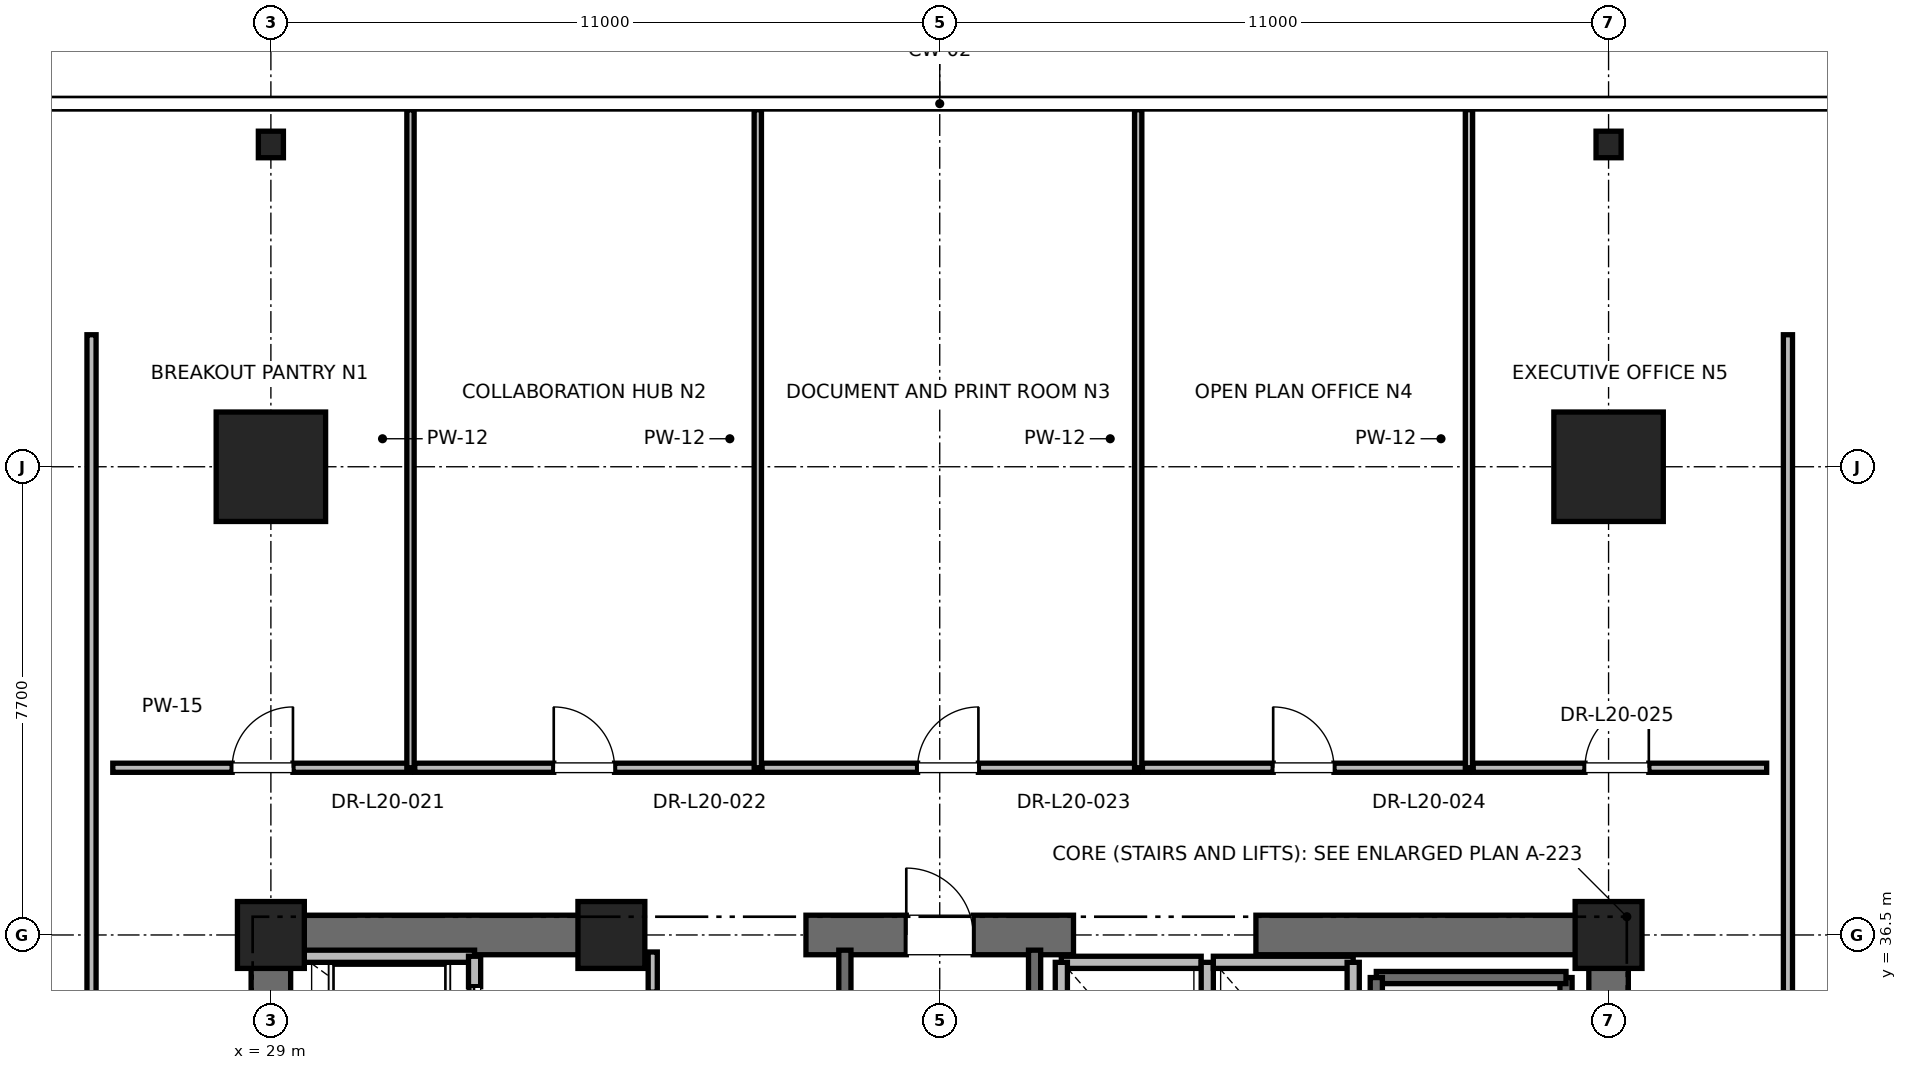
"""IFC4 building model, lengths in metres.
Left out: names, types, materials, properties, quantities, classifications, styles, units other than length and angle.
Written with IfcOpenShell. Run it as: python <this file> out.ifc"""

import sys

from ifc_helpers import new_model, si_unit, direction, frame, frame_2d, origin, origin_2d, place, context, subcontext, project, spatial, rectangle, i_section, extrude, element, fill, save


model = new_model("IFC4")
c1 = context("Model", 3, precision=1e-05, world=origin(), true_north=direction((0.0, 1.0)))
c2 = subcontext(c1, "Body", "Model", "MODEL_VIEW")
j1 = project(units=[si_unit("LENGTHUNIT", "METRE"), si_unit("PLANEANGLEUNIT", "RADIAN")], contexts=[c1])
p1 = place(None, origin())
s1 = spatial("IfcSite", under=j1, at=p1, CompositionType="ELEMENT")
p2 = place(p1, origin())
s2 = spatial("IfcBuilding", under=s1, at=p2, CompositionType="ELEMENT")
p3 = place(p2, frame((0.0, 0.0, 87.6)))
s3 = spatial("IfcBuildingStorey", under=s2, at=p3, CompositionType="ELEMENT", Elevation=87.6)
for number, where, z_axis, x_axis in (
    (1, (29.0, 44.2, 0.0), (0.0, 0.0, 1.0), (1.0, 0.0, 0.0)),
    (2, (51.0, 44.2, 0.0), (0.0, 0.0, 1.0), (1.0, 0.0, 0.0)),
):
    element("IfcColumn", number, at=place(p3, frame(where, z_axis=z_axis, x_axis=x_axis)), inside=s3, PredefinedType="COLUMN", context=c2, shape_type="SweptSolid", body=[
        extrude(rectangle(XDim=1.8, YDim=1.8, at=origin_2d()), origin(), (0.0, 0.0, 1.0), 4.0),
    ])
for number, where, z_axis, x_axis in (
    (3, (29.0, 49.5, 0.0), (0.0, 0.0, 1.0), (1.0, 0.0, 0.0)),
    (4, (51.0, 49.5, 0.0), (0.0, 0.0, 1.0), (1.0, 0.0, 0.0)),
):
    element("IfcColumn", number, at=place(p3, frame(where, z_axis=z_axis, x_axis=x_axis)), inside=s3, PredefinedType="COLUMN", context=c2, shape_type="SweptSolid", body=[
        extrude(i_section(OverallWidth=0.412, OverallDepth=0.437, WebThickness=0.036, FlangeThickness=0.058, FilletRadius=0.015, at=origin_2d()), origin(), (0.0, 0.0, 1.0), 4.0),
    ])
for number, where, z_axis, x_axis in (
    (5, (29.0, 36.5, 0.0), (0.0, 0.0, 1.0), (1.0, 0.0, 0.0)),
    (6, (51.0, 36.5, 0.0), (0.0, 0.0, 1.0), (1.0, 0.0, 0.0)),
    (7, (34.6, 36.5, 0.0), (0.0, 0.0, 1.0), (1.0, 0.0, 0.0)),
):
    element("IfcColumn", number, at=place(p3, frame(where, z_axis=z_axis, x_axis=x_axis)), inside=s3, PredefinedType="PILASTER", context=c2, shape_type="SweptSolid", body=[
        extrude(rectangle(XDim=1.1, YDim=1.1, at=origin_2d()), origin(), (0.0, 0.0, 1.0), 4.0),
    ])
p4 = place(p3, frame((29.0, 36.5, 0.0), z_axis=(0.0, 0.0, 1.0), x_axis=(1.0, 0.0, 0.0)))
e8 = element("IfcWall", 8, at=p4, inside=s3, PredefinedType="SHEAR", context=c2, shape_type="SweptSolid", body=[
    extrude(rectangle(XDim=5.8, YDim=0.65, at=frame_2d((2.9, 0.0))), origin(), (0.0, 0.0, 1.0), 3.76),
])
p5 = place(p3, frame((37.8, 36.5, 0.0), z_axis=(0.0, 0.0, 1.0), x_axis=(1.0, 0.0, 0.0)))
e9 = element("IfcWall", 9, at=p5, inside=s3, PredefinedType="SHEAR", context=c2, shape_type="SweptSolid", body=[
    extrude(rectangle(XDim=4.4, YDim=0.65, at=frame_2d((2.2, 0.0))), origin(), (0.0, 0.0, 1.0), 3.76),
])
p6 = place(p5, frame((1.65, 0.0, 0.0)))
e10 = element("IfcOpeningElement", 10, at=p6, cuts=e9, PredefinedType="OPENING", context=c2, shape_type="SweptSolid", body=[
    extrude(rectangle(XDim=1.1, YDim=2.15, at=frame_2d((0.55, 1.075))), frame((0.0, 0.325, 0.0), z_axis=(0.0, -1.0, 0.0), x_axis=(1.0, 0.0, 0.0)), (0.0, 0.0, 1.0), 0.65),
])
for number, where, z_axis, x_axis in (
    (11, (45.2, 36.5, 0.0), (0.0, 0.0, 1.0), (1.0, 0.0, 0.0)),
    (12, (29.0, 30.7, 0.0), (0.0, 0.0, 1.0), (0.0, 1.0, 0.0)),
):
    element("IfcWall", number, at=place(p3, frame(where, z_axis=z_axis, x_axis=x_axis)), inside=s3, PredefinedType="SHEAR", context=c2, shape_type="SweptSolid", body=[
        extrude(rectangle(XDim=5.8, YDim=0.65, at=frame_2d((2.9, 0.0))), origin(), (0.0, 0.0, 1.0), 3.76),
    ])
p7 = place(p3, frame((51.0, 27.7, 0.0), z_axis=(0.0, 0.0, 1.0), x_axis=(0.0, 1.0, 0.0)))
e13 = element("IfcWall", 13, at=p7, inside=s3, PredefinedType="SHEAR", context=c2, shape_type="SweptSolid", body=[
    extrude(rectangle(XDim=8.8, YDim=0.65, at=frame_2d((4.4, 0.0))), origin(), (0.0, 0.0, 1.0), 3.76),
])
p8 = place(p3, frame((50.3, 27.65, 0.0), z_axis=(0.0, 0.0, 1.0), x_axis=(0.0, 1.0, 0.0)))
e14 = element("IfcWall", 14, at=p8, inside=s3, PredefinedType="SOLIDWALL", context=c2, shape_type="SweptSolid", body=[
    extrude(rectangle(XDim=8.15, YDim=0.2, at=frame_2d((4.075, 0.0))), origin(), (0.0, 0.0, 1.0), 3.76),
])
p9 = place(p3, frame((47.18, 35.8, 0.0), z_axis=(0.0, 0.0, 1.0), x_axis=(1.0, 0.0, 0.0)))
e15 = element("IfcWall", 15, at=p9, inside=s3, PredefinedType="SOLIDWALL", context=c2, shape_type="SweptSolid", body=[
    extrude(rectangle(XDim=3.12, YDim=0.2, at=frame_2d((1.56, 0.0))), origin(), (0.0, 0.0, 1.0), 3.76),
])
p10 = place(p3, frame((47.18, 27.62, 0.0), z_axis=(0.0, 0.0, 1.0), x_axis=(0.0, 1.0, 0.0)))
e16 = element("IfcWall", 16, at=p10, inside=s3, PredefinedType="SOLIDWALL", context=c2, shape_type="SweptSolid", body=[
    extrude(rectangle(XDim=8.18, YDim=0.2, at=frame_2d((4.09, 0.0))), origin(), (0.0, 0.0, 1.0), 3.76),
])
p11 = place(p3, frame((38.44, 27.38, 0.0), z_axis=(0.0, 0.0, 1.0), x_axis=(0.0, 1.0, 0.0)))
e17 = element("IfcWall", 17, at=p11, inside=s3, PredefinedType="SOLIDWALL", context=c2, shape_type="SweptSolid", body=[
    extrude(rectangle(XDim=8.87, YDim=0.2, at=frame_2d((4.435, 0.0))), origin(), (0.0, 0.0, 1.0), 3.76),
])
p12 = place(p3, frame((41.56, 27.68, 0.0), z_axis=(0.0, 0.0, 1.0), x_axis=(0.0, 1.0, 0.0)))
e18 = element("IfcWall", 18, at=p12, inside=s3, PredefinedType="SOLIDWALL", context=c2, shape_type="SweptSolid", body=[
    extrude(rectangle(XDim=8.57, YDim=0.2, at=frame_2d((4.285, 0.0))), origin(), (0.0, 0.0, 1.0), 3.76),
])
p13 = place(p3, frame((32.35, 36.15, 0.0), z_axis=(0.0, 0.0, 1.0), x_axis=(-1.0, 0.0, 0.0)))
e19 = element("IfcWall", 19, at=p13, inside=s3, PredefinedType="SOLIDWALL", context=c2, shape_type="SweptSolid", body=[
    extrude(rectangle(XDim=2.8, YDim=0.2, at=frame_2d((1.4, 0.0))), origin(), (0.0, 0.0, 1.0), 2.889),
])
p14 = place(p3, frame((32.35, 34.05, 0.0), z_axis=(0.0, 0.0, 1.0), x_axis=(0.0, 1.0, 0.0)))
e20 = element("IfcWall", 20, at=p14, inside=s3, PredefinedType="SOLIDWALL", context=c2, shape_type="SweptSolid", body=[
    extrude(rectangle(XDim=2.1, YDim=0.2, at=frame_2d((1.05, 0.0))), origin(), (0.0, 0.0, 1.0), 3.76),
])
p15 = place(p14, frame((0.5, 0.0, 0.0)))
e21 = element("IfcOpeningElement", 21, at=p15, cuts=e20, PredefinedType="OPENING", context=c2, shape_type="SweptSolid", body=[
    extrude(rectangle(XDim=1.1, YDim=2.2, at=frame_2d((0.55, 1.1))), frame((0.0, 0.1, 0.0), z_axis=(0.0, -1.0, 0.0), x_axis=(1.0, 0.0, 0.0)), (0.0, 0.0, 1.0), 0.2),
])
p16 = place(p3, frame((44.3, 36.05, 0.0), z_axis=(0.0, 0.0, 1.0), x_axis=(-1.0, 0.0, 0.0)))
e22 = element("IfcWall", 22, at=p16, inside=s3, PredefinedType="SOLIDWALL", context=c2, shape_type="SweptSolid", body=[
    extrude(rectangle(XDim=2.3, YDim=0.2, at=frame_2d((1.15, 0.0))), origin(), (0.0, 0.0, 1.0), 2.54),
])
for number, where, z_axis, x_axis in (
    (23, (42.0, 36.05, 0.0), (0.0, 0.0, 1.0), (0.0, -1.0, 0.0)),
    (24, (44.4, 33.45, 0.0), (0.0, 0.0, 1.0), (0.0, 1.0, 0.0)),
):
    element("IfcWall", number, at=place(p3, frame(where, z_axis=z_axis, x_axis=x_axis)), inside=s3, PredefinedType="SOLIDWALL", context=c2, shape_type="SweptSolid", body=[
        extrude(rectangle(XDim=2.6, YDim=0.2, at=frame_2d((1.3, 0.0))), origin(), (0.0, 0.0, 1.0), 2.54),
    ])
p17 = place(p3, frame((46.8, 36.05, 0.0), z_axis=(0.0, 0.0, 1.0), x_axis=(-1.0, 0.0, 0.0)))
e25 = element("IfcWall", 25, at=p17, inside=s3, PredefinedType="SOLIDWALL", context=c2, shape_type="SweptSolid", body=[
    extrude(rectangle(XDim=2.3, YDim=0.2, at=frame_2d((1.15, 0.0))), origin(), (0.0, 0.0, 1.0), 2.54),
])
p18 = place(p3, frame((46.8, 33.45, 0.0), z_axis=(0.0, 0.0, 1.0), x_axis=(0.0, 1.0, 0.0)))
e26 = element("IfcWall", 26, at=p18, inside=s3, PredefinedType="SOLIDWALL", context=c2, shape_type="SweptSolid", body=[
    extrude(rectangle(XDim=2.6, YDim=0.2, at=frame_2d((1.3, 0.0))), origin(), (0.0, 0.0, 1.0), 3.76),
])
p19 = place(p3, frame((35.28, 33.95, 0.0), z_axis=(0.0, 0.0, 1.0), x_axis=(0.0, 1.0, 0.0)))
e27 = element("IfcWall", 27, at=p19, inside=s3, PredefinedType="PARTITIONING", context=c2, shape_type="SweptSolid", body=[
    extrude(rectangle(XDim=2.27, YDim=0.15, at=frame_2d((1.135, 0.0))), origin(), (0.0, 0.0, 1.0), 2.54),
])
p20 = place(p19, frame((0.66, 0.0, 0.0)))
e28 = element("IfcOpeningElement", 28, at=p20, cuts=e27, PredefinedType="OPENING", context=c2, shape_type="SweptSolid", body=[
    extrude(rectangle(XDim=0.95, YDim=2.15, at=frame_2d((0.475, 1.075))), frame((0.0, 0.075, 0.0), z_axis=(0.0, -1.0, 0.0), x_axis=(1.0, 0.0, 0.0)), (0.0, 0.0, 1.0), 0.15),
])
p21 = place(p3, frame((26.4, 39.25, 0.0), z_axis=(0.0, 0.0, 1.0), x_axis=(1.0, 0.0, 0.0)))
e29 = element("IfcWall", 29, at=p21, inside=s3, PredefinedType="PARTITIONING", context=c2, shape_type="SweptSolid", body=[
    extrude(rectangle(XDim=4.896, YDim=0.15, at=frame_2d((2.448, 0.0))), origin(), (0.0, 0.0, 1.0), 2.85),
])
p22 = place(p21, frame((1.963, 0.0, 0.0)))
e30 = element("IfcOpeningElement", 30, at=p22, cuts=e29, PredefinedType="OPENING", context=c2, shape_type="SweptSolid", body=[
    extrude(rectangle(XDim=1.0, YDim=2.15, at=frame_2d((0.5, 1.075))), frame((0.0, 0.075, 0.0), z_axis=(0.0, -1.0, 0.0), x_axis=(1.0, 0.0, 0.0)), (0.0, 0.0, 1.0), 0.15),
])
p23 = place(p3, frame((31.296, 39.25, 0.0), z_axis=(0.0, 0.0, 1.0), x_axis=(0.0, 1.0, 0.0)))
e31 = element("IfcWall", 31, at=p23, inside=s3, PredefinedType="PARTITIONING", context=c2, shape_type="SweptSolid", body=[
    extrude(rectangle(XDim=10.821, YDim=0.12, at=frame_2d((5.41, 0.0))), origin(), (0.0, 0.0, 1.0), 2.39),
])
p24 = place(p3, frame((31.366, 39.25, 0.0), z_axis=(0.0, 0.0, 1.0), x_axis=(1.0, 0.0, 0.0)))
e32 = element("IfcWall", 32, at=p24, inside=s3, PredefinedType="PARTITIONING", context=c2, shape_type="SweptSolid", body=[
    extrude(rectangle(XDim=5.642, YDim=0.15, at=frame_2d((2.821, 0.0))), origin(), (0.0, 0.0, 1.0), 2.85),
])
p25 = place(p24, frame((2.286, 0.0, 0.0)))
e33 = element("IfcOpeningElement", 33, at=p25, cuts=e32, PredefinedType="OPENING", context=c2, shape_type="SweptSolid", body=[
    extrude(rectangle(XDim=1.0, YDim=2.15, at=frame_2d((0.5, 1.075))), frame((0.0, 0.075, 0.0), z_axis=(0.0, -1.0, 0.0), x_axis=(1.0, 0.0, 0.0)), (0.0, 0.0, 1.0), 0.15),
])
p26 = place(p3, frame((37.008, 39.25, 0.0), z_axis=(0.0, 0.0, 1.0), x_axis=(0.0, 1.0, 0.0)))
e34 = element("IfcWall", 34, at=p26, inside=s3, PredefinedType="PARTITIONING", context=c2, shape_type="SweptSolid", body=[
    extrude(rectangle(XDim=10.821, YDim=0.12, at=frame_2d((5.41, 0.0))), origin(), (0.0, 0.0, 1.0), 2.39),
])
p27 = place(p3, frame((37.078, 39.25, 0.0), z_axis=(0.0, 0.0, 1.0), x_axis=(1.0, 0.0, 0.0)))
e35 = element("IfcWall", 35, at=p27, inside=s3, PredefinedType="PARTITIONING", context=c2, shape_type="SweptSolid", body=[
    extrude(rectangle(XDim=6.186, YDim=0.15, at=frame_2d((3.093, 0.0))), origin(), (0.0, 0.0, 1.0), 2.85),
])
p28 = place(p27, frame((2.558, 0.0, 0.0)))
e36 = element("IfcOpeningElement", 36, at=p28, cuts=e35, PredefinedType="OPENING", context=c2, shape_type="SweptSolid", body=[
    extrude(rectangle(XDim=1.0, YDim=2.15, at=frame_2d((0.5, 1.075))), frame((0.0, 0.075, 0.0), z_axis=(0.0, -1.0, 0.0), x_axis=(1.0, 0.0, 0.0)), (0.0, 0.0, 1.0), 0.15),
])
p29 = place(p3, frame((43.264, 39.25, 0.0), z_axis=(0.0, 0.0, 1.0), x_axis=(0.0, 1.0, 0.0)))
e37 = element("IfcWall", 37, at=p29, inside=s3, PredefinedType="PARTITIONING", context=c2, shape_type="SweptSolid", body=[
    extrude(rectangle(XDim=10.821, YDim=0.12, at=frame_2d((5.41, 0.0))), origin(), (0.0, 0.0, 1.0), 2.39),
])
p30 = place(p3, frame((43.334, 39.25, 0.0), z_axis=(0.0, 0.0, 1.0), x_axis=(1.0, 0.0, 0.0)))
e38 = element("IfcWall", 38, at=p30, inside=s3, PredefinedType="PARTITIONING", context=c2, shape_type="SweptSolid", body=[
    extrude(rectangle(XDim=5.37, YDim=0.15, at=frame_2d((2.685, 0.0))), origin(), (0.0, 0.0, 1.0), 2.85),
])
p31 = place(p30, frame((2.15, 0.0, 0.0)))
e39 = element("IfcOpeningElement", 39, at=p31, cuts=e38, PredefinedType="OPENING", context=c2, shape_type="SweptSolid", body=[
    extrude(rectangle(XDim=1.0, YDim=2.15, at=frame_2d((0.5, 1.075))), frame((0.0, 0.075, 0.0), z_axis=(0.0, -1.0, 0.0), x_axis=(1.0, 0.0, 0.0)), (0.0, 0.0, 1.0), 0.15),
])
p32 = place(p3, frame((48.704, 39.25, 0.0), z_axis=(0.0, 0.0, 1.0), x_axis=(0.0, 1.0, 0.0)))
e40 = element("IfcWall", 40, at=p32, inside=s3, PredefinedType="PARTITIONING", context=c2, shape_type="SweptSolid", body=[
    extrude(rectangle(XDim=10.821, YDim=0.12, at=frame_2d((5.41, 0.0))), origin(), (0.0, 0.0, 1.0), 2.39),
])
p33 = place(p3, frame((48.774, 39.25, 0.0), z_axis=(0.0, 0.0, 1.0), x_axis=(1.0, 0.0, 0.0)))
e41 = element("IfcWall", 41, at=p33, inside=s3, PredefinedType="PARTITIONING", context=c2, shape_type="SweptSolid", body=[
    extrude(rectangle(XDim=4.826, YDim=0.15, at=frame_2d((2.413, 0.0))), origin(), (0.0, 0.0, 1.0), 2.85),
])
p34 = place(p33, frame((1.838, 0.0, 0.0)))
e42 = element("IfcOpeningElement", 42, at=p34, cuts=e41, PredefinedType="OPENING", context=c2, shape_type="SweptSolid", body=[
    extrude(rectangle(XDim=1.05, YDim=2.2, at=frame_2d((0.525, 1.1))), frame((0.0, 0.075, 0.0), z_axis=(0.0, -1.0, 0.0), x_axis=(1.0, 0.0, 0.0)), (0.0, 0.0, 1.0), 0.15),
])
p35 = place(p3, frame((26.05, 24.551, 0.0), z_axis=(0.0, 0.0, 1.0), x_axis=(0.0, 1.0, 0.0)))
e43 = element("IfcWall", 43, at=p35, inside=s3, PredefinedType="PARTITIONING", context=c2, shape_type="SweptSolid", body=[
    extrude(rectangle(XDim=21.82, YDim=0.15, at=frame_2d((10.91, 0.0))), origin(), (0.0, 0.0, 1.0), 2.85),
])
p36 = place(p35, frame((5.425, 0.0, 0.0)))
e44 = element("IfcOpeningElement", 44, at=p36, cuts=e43, PredefinedType="OPENING", context=c2, shape_type="SweptSolid", body=[
    extrude(rectangle(XDim=1.0, YDim=2.15, at=frame_2d((0.5, 1.075))), frame((0.0, 0.075, 0.0), z_axis=(0.0, -1.0, 0.0), x_axis=(1.0, 0.0, 0.0)), (0.0, 0.0, 1.0), 0.15),
])
p37 = place(p3, frame((53.95, 30.589, 0.0), z_axis=(0.0, 0.0, 1.0), x_axis=(0.0, 1.0, 0.0)))
e45 = element("IfcWall", 45, at=p37, inside=s3, PredefinedType="PARTITIONING", context=c2, shape_type="SweptSolid", body=[
    extrude(rectangle(XDim=15.781, YDim=0.15, at=frame_2d((7.891, 0.0))), origin(), (0.0, 0.0, 1.0), 2.85),
])
p38 = place(p37, frame((2.405, 0.0, 0.0)))
e46 = element("IfcOpeningElement", 46, at=p38, cuts=e45, PredefinedType="OPENING", context=c2, shape_type="SweptSolid", body=[
    extrude(rectangle(XDim=1.0, YDim=2.15, at=frame_2d((0.5, 1.075))), frame((0.0, 0.075, 0.0), z_axis=(0.0, -1.0, 0.0), x_axis=(1.0, 0.0, 0.0)), (0.0, 0.0, 1.0), 0.15),
])
p39 = place(p6, origin())
e47 = element("IfcDoor", 47, at=p39, inside=s3, OperationType="SINGLE_SWING_LEFT", PredefinedType="DOOR", context=c2, shape_type="SweptSolid", body=[
    extrude(rectangle(XDim=1.1, YDim=2.15, at=frame_2d((0.55, 1.075))), frame((0.0, 0.025, 0.0), z_axis=(0.0, -1.0, 0.0), x_axis=(1.0, 0.0, 0.0)), (0.0, 0.0, 1.0), 0.05),
])
fill(e10, e47)
p40 = place(p15, origin())
e48 = element("IfcDoor", 48, at=p40, inside=s3, OperationType="SLIDING_TO_RIGHT", PredefinedType="DOOR", context=c2, shape_type="SweptSolid", body=[
    extrude(rectangle(XDim=1.1, YDim=2.2, at=frame_2d((0.55, 1.1))), frame((0.0, 0.025, 0.0), z_axis=(0.0, -1.0, 0.0), x_axis=(1.0, 0.0, 0.0)), (0.0, 0.0, 1.0), 0.05),
])
fill(e21, e48)
p41 = place(p22, origin())
e49 = element("IfcDoor", 49, at=p41, inside=s3, OperationType="SINGLE_SWING_RIGHT", PredefinedType="DOOR", context=c2, shape_type="SweptSolid", body=[
    extrude(rectangle(XDim=1.0, YDim=2.15, at=frame_2d((0.5, 1.075))), frame((0.0, 0.025, 0.0), z_axis=(0.0, -1.0, 0.0), x_axis=(1.0, 0.0, 0.0)), (0.0, 0.0, 1.0), 0.05),
])
fill(e30, e49)
p42 = place(p25, origin())
e50 = element("IfcDoor", 50, at=p42, inside=s3, OperationType="SINGLE_SWING_LEFT", PredefinedType="DOOR", context=c2, shape_type="SweptSolid", body=[
    extrude(rectangle(XDim=1.0, YDim=2.15, at=frame_2d((0.5, 1.075))), frame((0.0, 0.025, 0.0), z_axis=(0.0, -1.0, 0.0), x_axis=(1.0, 0.0, 0.0)), (0.0, 0.0, 1.0), 0.05),
])
fill(e33, e50)
p43 = place(p28, origin())
e51 = element("IfcDoor", 51, at=p43, inside=s3, OperationType="SINGLE_SWING_RIGHT", PredefinedType="DOOR", context=c2, shape_type="SweptSolid", body=[
    extrude(rectangle(XDim=1.0, YDim=2.15, at=frame_2d((0.5, 1.075))), frame((0.0, 0.025, 0.0), z_axis=(0.0, -1.0, 0.0), x_axis=(1.0, 0.0, 0.0)), (0.0, 0.0, 1.0), 0.05),
])
fill(e36, e51)
p44 = place(p31, origin())
e52 = element("IfcDoor", 52, at=p44, inside=s3, OperationType="SINGLE_SWING_LEFT", PredefinedType="DOOR", context=c2, shape_type="SweptSolid", body=[
    extrude(rectangle(XDim=1.0, YDim=2.15, at=frame_2d((0.5, 1.075))), frame((0.0, 0.025, 0.0), z_axis=(0.0, -1.0, 0.0), x_axis=(1.0, 0.0, 0.0)), (0.0, 0.0, 1.0), 0.05),
])
fill(e39, e52)
p45 = place(p34, origin())
e53 = element("IfcDoor", 53, at=p45, inside=s3, OperationType="SINGLE_SWING_RIGHT", PredefinedType="DOOR", context=c2, shape_type="SweptSolid", body=[
    extrude(rectangle(XDim=1.05, YDim=2.2, at=frame_2d((0.525, 1.1))), frame((0.0, 0.025, 0.0), z_axis=(0.0, -1.0, 0.0), x_axis=(1.0, 0.0, 0.0)), (0.0, 0.0, 1.0), 0.05),
])
fill(e42, e53)
save(model, sys.argv[1])
